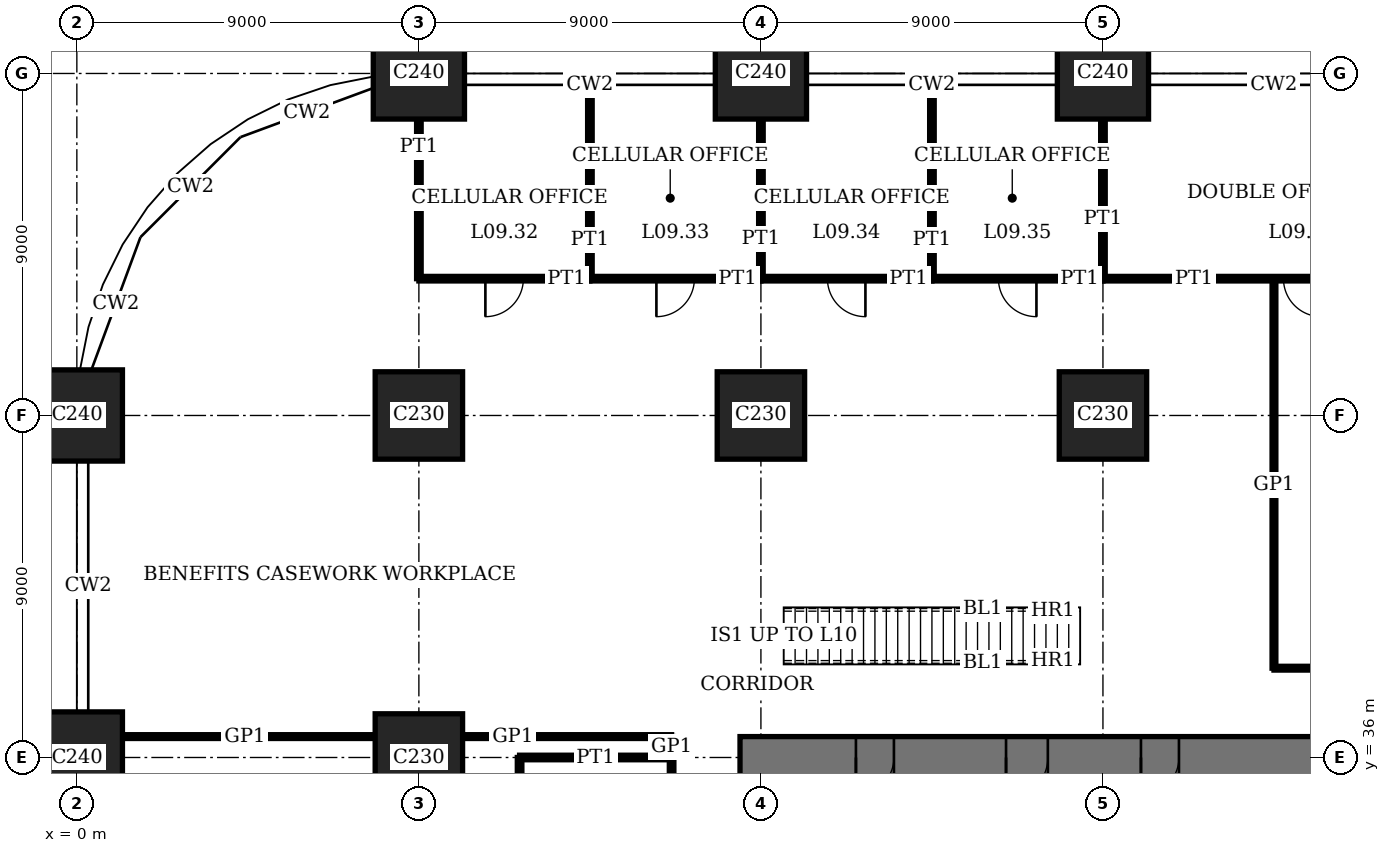
"""IFC4 building model, lengths in metres.
Left out: names, types, materials, properties, quantities, classifications, styles, units other than length and angle.
Written with IfcOpenShell. Run it as: python <this file> out.ifc"""

import sys

from ifc_helpers import new_model, si_unit, direction, frame, frame_2d, origin, origin_2d, place, context, subcontext, project, spatial, rectangle, extrude, element, fill, save


model = new_model("IFC4")
c1 = context("Model", 3, precision=1e-05, world=origin(), true_north=direction((0.0, 1.0)))
c2 = subcontext(c1, "Body", "Model", "MODEL_VIEW")
j1 = project(units=[si_unit("LENGTHUNIT", "METRE"), si_unit("PLANEANGLEUNIT", "RADIAN")], contexts=[c1])
p1 = place(None, origin())
s1 = spatial("IfcSite", under=j1, at=p1, CompositionType="ELEMENT")
p2 = place(p1, origin())
s2 = spatial("IfcBuilding", under=s1, at=p2, CompositionType="ELEMENT")
p3 = place(p2, frame((0.0, 0.0, 39.8)))
s3 = spatial("IfcBuildingStorey", under=s2, at=p3, CompositionType="ELEMENT", Elevation=39.8)
for number, where, z_axis, x_axis in (
    (1, (0.0, 36.0, 0.0), (0.0, 0.0, 1.0), (1.0, 0.0, 0.0)),
    (2, (0.0, 45.0, 0.0), (0.0, 0.0, 1.0), (1.0, 0.0, 0.0)),
):
    element("IfcColumn", number, at=place(p3, frame(where, z_axis=z_axis, x_axis=x_axis)), inside=s3, PredefinedType="COLUMN", context=c2, shape_type="SweptSolid", body=[
        extrude(rectangle(XDim=2.4, YDim=2.4, at=origin_2d()), origin(), (0.0, 0.0, 1.0), 4.0),
    ])
for number, where, z_axis, x_axis in (
    (3, (9.0, 36.0, 0.0), (0.0, 0.0, 1.0), (1.0, 0.0, 0.0)),
    (4, (9.0, 45.0, 0.0), (0.0, 0.0, 1.0), (1.0, 0.0, 0.0)),
):
    element("IfcColumn", number, at=place(p3, frame(where, z_axis=z_axis, x_axis=x_axis)), inside=s3, PredefinedType="COLUMN", context=c2, shape_type="SweptSolid", body=[
        extrude(rectangle(XDim=2.3, YDim=2.3, at=origin_2d()), origin(), (0.0, 0.0, 1.0), 4.0),
    ])
p4 = place(p3, frame((9.0, 54.0, 0.0), z_axis=(0.0, 0.0, 1.0), x_axis=(1.0, 0.0, 0.0)))
e5 = element("IfcColumn", 5, at=p4, inside=s3, PredefinedType="COLUMN", context=c2, shape_type="SweptSolid", body=[
    extrude(rectangle(XDim=2.4, YDim=2.4, at=origin_2d()), origin(), (0.0, 0.0, 1.0), 4.0),
])
p5 = place(p3, frame((18.0, 45.0, 0.0), z_axis=(0.0, 0.0, 1.0), x_axis=(1.0, 0.0, 0.0)))
e6 = element("IfcColumn", 6, at=p5, inside=s3, PredefinedType="COLUMN", context=c2, shape_type="SweptSolid", body=[
    extrude(rectangle(XDim=2.3, YDim=2.3, at=origin_2d()), origin(), (0.0, 0.0, 1.0), 4.0),
])
p6 = place(p3, frame((18.0, 54.0, 0.0), z_axis=(0.0, 0.0, 1.0), x_axis=(1.0, 0.0, 0.0)))
e7 = element("IfcColumn", 7, at=p6, inside=s3, PredefinedType="COLUMN", context=c2, shape_type="SweptSolid", body=[
    extrude(rectangle(XDim=2.4, YDim=2.4, at=origin_2d()), origin(), (0.0, 0.0, 1.0), 4.0),
])
p7 = place(p3, frame((27.0, 45.0, 0.0), z_axis=(0.0, 0.0, 1.0), x_axis=(1.0, 0.0, 0.0)))
e8 = element("IfcColumn", 8, at=p7, inside=s3, PredefinedType="COLUMN", context=c2, shape_type="SweptSolid", body=[
    extrude(rectangle(XDim=2.3, YDim=2.3, at=origin_2d()), origin(), (0.0, 0.0, 1.0), 4.0),
])
p8 = place(p3, frame((27.0, 54.0, 0.0), z_axis=(0.0, 0.0, 1.0), x_axis=(1.0, 0.0, 0.0)))
e9 = element("IfcColumn", 9, at=p8, inside=s3, PredefinedType="COLUMN", context=c2, shape_type="SweptSolid", body=[
    extrude(rectangle(XDim=2.4, YDim=2.4, at=origin_2d()), origin(), (0.0, 0.0, 1.0), 4.0),
])
p9 = place(p3, frame((45.55, 36.0, 0.0), z_axis=(0.0, 0.0, 1.0), x_axis=(-1.0, 0.0, 0.0)))
e10 = element("IfcWall", 10, at=p9, inside=s3, PredefinedType="SHEAR", context=c2, shape_type="SweptSolid", body=[
    extrude(rectangle(XDim=28.1, YDim=1.1, at=frame_2d((14.05, 0.0))), origin(), (0.0, 0.0, 1.0), 4.0),
])
p10 = place(p9, frame((11.55, 0.0, 0.0)))
e11 = element("IfcOpeningElement", 11, at=p10, cuts=e10, PredefinedType="OPENING", context=c2, shape_type="SweptSolid", body=[
    extrude(rectangle(XDim=1.0, YDim=2.4, at=frame_2d((0.5, 1.2))), frame((0.0, 0.56, 0.0), z_axis=(0.0, -1.0, 0.0), x_axis=(1.0, 0.0, 0.0)), (0.0, 0.0, 1.0), 1.12),
])
p11 = place(p9, frame((16.55, 0.0, 0.0)))
e12 = element("IfcOpeningElement", 12, at=p11, cuts=e10, PredefinedType="OPENING", context=c2, shape_type="SweptSolid", body=[
    extrude(rectangle(XDim=1.0, YDim=2.4, at=frame_2d((0.5, 1.2))), frame((0.0, 0.56, 0.0), z_axis=(0.0, -1.0, 0.0), x_axis=(1.0, 0.0, 0.0)), (0.0, 0.0, 1.0), 1.12),
])
p12 = place(p9, frame((20.0, 0.0, 0.0)))
e13 = element("IfcOpeningElement", 13, at=p12, cuts=e10, PredefinedType="OPENING", context=c2, shape_type="SweptSolid", body=[
    extrude(rectangle(XDim=1.1, YDim=2.4, at=frame_2d((0.55, 1.2))), frame((0.0, 0.56, 0.0), z_axis=(0.0, -1.0, 0.0), x_axis=(1.0, 0.0, 0.0)), (0.0, 0.0, 1.0), 1.12),
])
p13 = place(p9, frame((24.05, 0.0, 0.0)))
e14 = element("IfcOpeningElement", 14, at=p13, cuts=e10, PredefinedType="OPENING", context=c2, shape_type="SweptSolid", body=[
    extrude(rectangle(XDim=1.0, YDim=2.4, at=frame_2d((0.5, 1.2))), frame((0.0, 0.56, 0.0), z_axis=(0.0, -1.0, 0.0), x_axis=(1.0, 0.0, 0.0)), (0.0, 0.0, 1.0), 1.12),
])
p14 = place(p3, frame((11.65, 36.0, 0.0), z_axis=(0.0, 0.0, 1.0), x_axis=(1.0, 0.0, 0.0)))
e15 = element("IfcWall", 15, at=p14, inside=s3, PredefinedType="PARTITIONING", context=c2, shape_type="SweptSolid", body=[
    extrude(rectangle(XDim=4.0, YDim=0.12, at=frame_2d((2.0, 0.0))), origin(), (0.0, 0.0, 1.0), 3.05),
])
p15 = place(p3, frame((1.2, 36.55, 0.0), z_axis=(0.0, 0.0, 1.0), x_axis=(1.0, 0.0, 0.0)))
e16 = element("IfcWall", 16, at=p15, inside=s3, PredefinedType="PARTITIONING", context=c2, shape_type="SweptSolid", body=[
    extrude(rectangle(XDim=6.65, YDim=0.1, at=frame_2d((3.325, 0.0))), origin(), (0.0, 0.0, 1.0), 3.75),
])
p16 = place(p3, frame((10.15, 36.55, 0.0), z_axis=(0.0, 0.0, 1.0), x_axis=(1.0, 0.0, 0.0)))
e17 = element("IfcWall", 17, at=p16, inside=s3, PredefinedType="PARTITIONING", context=c2, shape_type="SweptSolid", body=[
    extrude(rectangle(XDim=5.5, YDim=0.1, at=frame_2d((2.75, 0.0))), origin(), (0.0, 0.0, 1.0), 3.75),
])
p17 = place(p3, frame((31.5, 38.35, 0.0), z_axis=(0.0, 0.0, 1.0), x_axis=(1.0, 0.0, 0.0)))
e18 = element("IfcWall", 18, at=p17, inside=s3, PredefinedType="PARTITIONING", context=c2, shape_type="SweptSolid", body=[
    extrude(rectangle(XDim=4.5, YDim=0.1, at=frame_2d((2.25, 0.0))), origin(), (0.0, 0.0, 1.0), 3.75),
])
p18 = place(p17, frame((1.75, 0.0, 0.0)))
e19 = element("IfcOpeningElement", 19, at=p18, cuts=e18, PredefinedType="OPENING", context=c2, shape_type="SweptSolid", body=[
    extrude(rectangle(XDim=1.0, YDim=2.4, at=frame_2d((0.5, 1.2))), frame((0.0, 0.06, 0.0), z_axis=(0.0, -1.0, 0.0), x_axis=(1.0, 0.0, 0.0)), (0.0, 0.0, 1.0), 0.12),
])
p19 = place(p3, frame((9.0, 48.6, 0.0), z_axis=(0.0, 0.0, 1.0), x_axis=(1.0, 0.0, 0.0)))
e20 = element("IfcWall", 20, at=p19, inside=s3, PredefinedType="PARTITIONING", context=c2, shape_type="SweptSolid", body=[
    extrude(rectangle(XDim=4.5, YDim=0.12, at=frame_2d((2.25, 0.0))), origin(), (0.0, 0.0, 1.0), 3.75),
])
p20 = place(p19, frame((1.75, 0.0, 0.0)))
e21 = element("IfcOpeningElement", 21, at=p20, cuts=e20, PredefinedType="OPENING", context=c2, shape_type="SweptSolid", body=[
    extrude(rectangle(XDim=1.0, YDim=2.4, at=frame_2d((0.5, 1.2))), frame((0.0, 0.07, 0.0), z_axis=(0.0, -1.0, 0.0), x_axis=(1.0, 0.0, 0.0)), (0.0, 0.0, 1.0), 0.14),
])
p21 = place(p3, frame((13.5, 48.6, 0.0), z_axis=(0.0, 0.0, 1.0), x_axis=(1.0, 0.0, 0.0)))
e22 = element("IfcWall", 22, at=p21, inside=s3, PredefinedType="PARTITIONING", context=c2, shape_type="SweptSolid", body=[
    extrude(rectangle(XDim=4.5, YDim=0.12, at=frame_2d((2.25, 0.0))), origin(), (0.0, 0.0, 1.0), 3.75),
])
p22 = place(p21, frame((1.75, 0.0, 0.0)))
e23 = element("IfcOpeningElement", 23, at=p22, cuts=e22, PredefinedType="OPENING", context=c2, shape_type="SweptSolid", body=[
    extrude(rectangle(XDim=1.0, YDim=2.4, at=frame_2d((0.5, 1.2))), frame((0.0, 0.07, 0.0), z_axis=(0.0, -1.0, 0.0), x_axis=(1.0, 0.0, 0.0)), (0.0, 0.0, 1.0), 0.14),
])
p23 = place(p3, frame((18.0, 48.6, 0.0), z_axis=(0.0, 0.0, 1.0), x_axis=(1.0, 0.0, 0.0)))
e24 = element("IfcWall", 24, at=p23, inside=s3, PredefinedType="PARTITIONING", context=c2, shape_type="SweptSolid", body=[
    extrude(rectangle(XDim=4.5, YDim=0.12, at=frame_2d((2.25, 0.0))), origin(), (0.0, 0.0, 1.0), 3.75),
])
p24 = place(p23, frame((1.75, 0.0, 0.0)))
e25 = element("IfcOpeningElement", 25, at=p24, cuts=e24, PredefinedType="OPENING", context=c2, shape_type="SweptSolid", body=[
    extrude(rectangle(XDim=1.0, YDim=2.4, at=frame_2d((0.5, 1.2))), frame((0.0, 0.07, 0.0), z_axis=(0.0, -1.0, 0.0), x_axis=(1.0, 0.0, 0.0)), (0.0, 0.0, 1.0), 0.14),
])
p25 = place(p3, frame((22.5, 48.6, 0.0), z_axis=(0.0, 0.0, 1.0), x_axis=(1.0, 0.0, 0.0)))
e26 = element("IfcWall", 26, at=p25, inside=s3, PredefinedType="PARTITIONING", context=c2, shape_type="SweptSolid", body=[
    extrude(rectangle(XDim=4.5, YDim=0.12, at=frame_2d((2.25, 0.0))), origin(), (0.0, 0.0, 1.0), 3.75),
])
p26 = place(p25, frame((1.75, 0.0, 0.0)))
e27 = element("IfcOpeningElement", 27, at=p26, cuts=e26, PredefinedType="OPENING", context=c2, shape_type="SweptSolid", body=[
    extrude(rectangle(XDim=1.0, YDim=2.4, at=frame_2d((0.5, 1.2))), frame((0.0, 0.07, 0.0), z_axis=(0.0, -1.0, 0.0), x_axis=(1.0, 0.0, 0.0)), (0.0, 0.0, 1.0), 0.14),
])
p27 = place(p3, frame((27.0, 48.6, 0.0), z_axis=(0.0, 0.0, 1.0), x_axis=(1.0, 0.0, 0.0)))
e28 = element("IfcWall", 28, at=p27, inside=s3, PredefinedType="PARTITIONING", context=c2, shape_type="SweptSolid", body=[
    extrude(rectangle(XDim=9.0, YDim=0.12, at=frame_2d((4.5, 0.0))), origin(), (0.0, 0.0, 1.0), 3.75),
])
p28 = place(p27, frame((4.75, 0.0, 0.0)))
e29 = element("IfcOpeningElement", 29, at=p28, cuts=e28, PredefinedType="OPENING", context=c2, shape_type="SweptSolid", body=[
    extrude(rectangle(XDim=1.0, YDim=2.4, at=frame_2d((0.5, 1.2))), frame((0.0, 0.07, 0.0), z_axis=(0.0, -1.0, 0.0), x_axis=(1.0, 0.0, 0.0)), (0.0, 0.0, 1.0), 0.14),
])
p29 = place(p3, frame((9.0, 48.6, 0.0), z_axis=(0.0, 0.0, 1.0), x_axis=(0.0, 1.0, 0.0)))
e30 = element("IfcWall", 30, at=p29, inside=s3, PredefinedType="PARTITIONING", context=c2, shape_type="SweptSolid", body=[
    extrude(rectangle(XDim=4.2, YDim=0.12, at=frame_2d((2.1, 0.0))), origin(), (0.0, 0.0, 1.0), 3.05),
])
p30 = place(p3, frame((11.65, 31.5, 0.0), z_axis=(0.0, 0.0, 1.0), x_axis=(0.0, 1.0, 0.0)))
e31 = element("IfcWall", 31, at=p30, inside=s3, PredefinedType="PARTITIONING", context=c2, shape_type="SweptSolid", body=[
    extrude(rectangle(XDim=4.5, YDim=0.12, at=frame_2d((2.25, 0.0))), origin(), (0.0, 0.0, 1.0), 3.75),
])
p31 = place(p30, frame((1.75, 0.0, 0.0)))
e32 = element("IfcOpeningElement", 32, at=p31, cuts=e31, PredefinedType="OPENING", context=c2, shape_type="SweptSolid", body=[
    extrude(rectangle(XDim=1.0, YDim=2.4, at=frame_2d((0.5, 1.2))), frame((0.0, 0.07, 0.0), z_axis=(0.0, -1.0, 0.0), x_axis=(1.0, 0.0, 0.0)), (0.0, 0.0, 1.0), 0.14),
])
p32 = place(p3, frame((13.5, 48.6, 0.0), z_axis=(0.0, 0.0, 1.0), x_axis=(0.0, 1.0, 0.0)))
e33 = element("IfcWall", 33, at=p32, inside=s3, PredefinedType="PARTITIONING", context=c2, shape_type="SweptSolid", body=[
    extrude(rectangle(XDim=5.09, YDim=0.12, at=frame_2d((2.545, 0.0))), origin(), (0.0, 0.0, 1.0), 3.75),
])
p33 = place(p3, frame((15.65, 31.5, 0.0), z_axis=(0.0, 0.0, 1.0), x_axis=(0.0, 1.0, 0.0)))
e34 = element("IfcWall", 34, at=p33, inside=s3, PredefinedType="PARTITIONING", context=c2, shape_type="SweptSolid", body=[
    extrude(rectangle(XDim=4.5, YDim=0.12, at=frame_2d((2.25, 0.0))), origin(), (0.0, 0.0, 1.0), 3.75),
])
p34 = place(p3, frame((15.65, 36.0, 0.0), z_axis=(0.0, 0.0, 1.0), x_axis=(0.0, 1.0, 0.0)))
e35 = element("IfcWall", 35, at=p34, inside=s3, PredefinedType="PARTITIONING", context=c2, shape_type="SweptSolid", body=[
    extrude(rectangle(XDim=0.55, YDim=0.1, at=frame_2d((0.275, 0.0))), origin(), (0.0, 0.0, 1.0), 3.75),
])
p35 = place(p3, frame((18.0, 48.6, 0.0), z_axis=(0.0, 0.0, 1.0), x_axis=(0.0, 1.0, 0.0)))
e36 = element("IfcWall", 36, at=p35, inside=s3, PredefinedType="PARTITIONING", context=c2, shape_type="SweptSolid", body=[
    extrude(rectangle(XDim=4.2, YDim=0.12, at=frame_2d((2.1, 0.0))), origin(), (0.0, 0.0, 1.0), 3.05),
])
p36 = place(p3, frame((22.5, 48.6, 0.0), z_axis=(0.0, 0.0, 1.0), x_axis=(0.0, 1.0, 0.0)))
e37 = element("IfcWall", 37, at=p36, inside=s3, PredefinedType="PARTITIONING", context=c2, shape_type="SweptSolid", body=[
    extrude(rectangle(XDim=5.09, YDim=0.12, at=frame_2d((2.545, 0.0))), origin(), (0.0, 0.0, 1.0), 3.75),
])
p37 = place(p3, frame((27.0, 48.6, 0.0), z_axis=(0.0, 0.0, 1.0), x_axis=(0.0, 1.0, 0.0)))
e38 = element("IfcWall", 38, at=p37, inside=s3, PredefinedType="PARTITIONING", context=c2, shape_type="SweptSolid", body=[
    extrude(rectangle(XDim=4.2, YDim=0.12, at=frame_2d((2.1, 0.0))), origin(), (0.0, 0.0, 1.0), 3.05),
])
p38 = place(p3, frame((31.5, 38.35, 0.0), z_axis=(0.0, 0.0, 1.0), x_axis=(0.0, 1.0, 0.0)))
e39 = element("IfcWall", 39, at=p38, inside=s3, PredefinedType="PARTITIONING", context=c2, shape_type="SweptSolid", body=[
    extrude(rectangle(XDim=10.26, YDim=0.1, at=frame_2d((5.13, 0.0))), origin(), (0.0, 0.0, 1.0), 3.75),
])
p39 = place(p11, origin())
e40 = element("IfcDoor", 40, at=p39, inside=s3, OperationType="SINGLE_SWING_LEFT", PredefinedType="DOOR", context=c2, shape_type="SweptSolid", body=[
    extrude(rectangle(XDim=1.0, YDim=2.4, at=frame_2d((0.5, 1.2))), frame((0.0, 0.025, 0.0), z_axis=(0.0, -1.0, 0.0), x_axis=(1.0, 0.0, 0.0)), (0.0, 0.0, 1.0), 0.05),
    extrude(rectangle(XDim=0.04, YDim=2.4, at=frame_2d((0.02, 1.2))), frame((0.0, 0.4, 0.0), z_axis=(0.0, -1.0, 0.0), x_axis=(1.0, 0.0, 0.0)), (0.0, 0.0, 1.0), 0.8),
    extrude(rectangle(XDim=0.04, YDim=2.4, at=frame_2d((0.98, 1.2))), frame((0.0, 0.4, 0.0), z_axis=(0.0, -1.0, 0.0), x_axis=(1.0, 0.0, 0.0)), (0.0, 0.0, 1.0), 0.8),
    extrude(rectangle(XDim=1.0, YDim=0.04, at=frame_2d((0.5, 2.38))), frame((0.0, 0.4, 0.0), z_axis=(0.0, -1.0, 0.0), x_axis=(1.0, 0.0, 0.0)), (0.0, 0.0, 1.0), 0.8),
])
fill(e12, e40)
p40 = place(p12, origin())
e41 = element("IfcDoor", 41, at=p40, inside=s3, OperationType="SINGLE_SWING_LEFT", PredefinedType="DOOR", context=c2, shape_type="SweptSolid", body=[
    extrude(rectangle(XDim=1.1, YDim=2.4, at=frame_2d((0.55, 1.2))), frame((0.0, 0.025, 0.0), z_axis=(0.0, -1.0, 0.0), x_axis=(1.0, 0.0, 0.0)), (0.0, 0.0, 1.0), 0.05),
    extrude(rectangle(XDim=0.04, YDim=2.4, at=frame_2d((0.02, 1.2))), frame((0.0, 0.44, 0.0), z_axis=(0.0, -1.0, 0.0), x_axis=(1.0, 0.0, 0.0)), (0.0, 0.0, 1.0), 0.88),
    extrude(rectangle(XDim=0.04, YDim=2.4, at=frame_2d((1.08, 1.2))), frame((0.0, 0.44, 0.0), z_axis=(0.0, -1.0, 0.0), x_axis=(1.0, 0.0, 0.0)), (0.0, 0.0, 1.0), 0.88),
    extrude(rectangle(XDim=1.1, YDim=0.04, at=frame_2d((0.55, 2.38))), frame((0.0, 0.44, 0.0), z_axis=(0.0, -1.0, 0.0), x_axis=(1.0, 0.0, 0.0)), (0.0, 0.0, 1.0), 0.88),
])
fill(e13, e41)
p41 = place(p13, origin())
e42 = element("IfcDoor", 42, at=p41, inside=s3, OperationType="SINGLE_SWING_LEFT", PredefinedType="DOOR", context=c2, shape_type="SweptSolid", body=[
    extrude(rectangle(XDim=1.0, YDim=2.4, at=frame_2d((0.5, 1.2))), frame((0.0, 0.025, 0.0), z_axis=(0.0, -1.0, 0.0), x_axis=(1.0, 0.0, 0.0)), (0.0, 0.0, 1.0), 0.05),
    extrude(rectangle(XDim=0.04, YDim=2.4, at=frame_2d((0.02, 1.2))), frame((0.0, 0.4, 0.0), z_axis=(0.0, -1.0, 0.0), x_axis=(1.0, 0.0, 0.0)), (0.0, 0.0, 1.0), 0.8),
    extrude(rectangle(XDim=0.04, YDim=2.4, at=frame_2d((0.98, 1.2))), frame((0.0, 0.4, 0.0), z_axis=(0.0, -1.0, 0.0), x_axis=(1.0, 0.0, 0.0)), (0.0, 0.0, 1.0), 0.8),
    extrude(rectangle(XDim=1.0, YDim=0.04, at=frame_2d((0.5, 2.38))), frame((0.0, 0.4, 0.0), z_axis=(0.0, -1.0, 0.0), x_axis=(1.0, 0.0, 0.0)), (0.0, 0.0, 1.0), 0.8),
])
fill(e14, e42)
p42 = place(p20, origin())
e43 = element("IfcDoor", 43, at=p42, inside=s3, OperationType="SINGLE_SWING_LEFT", PredefinedType="DOOR", context=c2, shape_type="SweptSolid", body=[
    extrude(rectangle(XDim=1.0, YDim=2.4, at=frame_2d((0.5, 1.2))), frame((0.0, 0.025, 0.0), z_axis=(0.0, -1.0, 0.0), x_axis=(1.0, 0.0, 0.0)), (0.0, 0.0, 1.0), 0.05),
])
fill(e21, e43)
p43 = place(p22, origin())
e44 = element("IfcDoor", 44, at=p43, inside=s3, OperationType="SINGLE_SWING_LEFT", PredefinedType="DOOR", context=c2, shape_type="SweptSolid", body=[
    extrude(rectangle(XDim=1.0, YDim=2.4, at=frame_2d((0.5, 1.2))), frame((0.0, 0.025, 0.0), z_axis=(0.0, -1.0, 0.0), x_axis=(1.0, 0.0, 0.0)), (0.0, 0.0, 1.0), 0.05),
])
fill(e23, e44)
p44 = place(p24, origin())
e45 = element("IfcDoor", 45, at=p44, inside=s3, OperationType="SINGLE_SWING_RIGHT", PredefinedType="DOOR", context=c2, shape_type="SweptSolid", body=[
    extrude(rectangle(XDim=1.0, YDim=2.4, at=frame_2d((0.5, 1.2))), frame((0.0, 0.025, 0.0), z_axis=(0.0, -1.0, 0.0), x_axis=(1.0, 0.0, 0.0)), (0.0, 0.0, 1.0), 0.05),
])
fill(e25, e45)
p45 = place(p26, origin())
e46 = element("IfcDoor", 46, at=p45, inside=s3, OperationType="SINGLE_SWING_RIGHT", PredefinedType="DOOR", context=c2, shape_type="SweptSolid", body=[
    extrude(rectangle(XDim=1.0, YDim=2.4, at=frame_2d((0.5, 1.2))), frame((0.0, 0.025, 0.0), z_axis=(0.0, -1.0, 0.0), x_axis=(1.0, 0.0, 0.0)), (0.0, 0.0, 1.0), 0.05),
])
fill(e27, e46)
p46 = place(p28, origin())
e47 = element("IfcDoor", 47, at=p46, inside=s3, OperationType="SINGLE_SWING_RIGHT", PredefinedType="DOOR", context=c2, shape_type="SweptSolid", body=[
    extrude(rectangle(XDim=1.0, YDim=2.4, at=frame_2d((0.5, 1.2))), frame((0.0, 0.025, 0.0), z_axis=(0.0, -1.0, 0.0), x_axis=(1.0, 0.0, 0.0)), (0.0, 0.0, 1.0), 0.05),
])
fill(e29, e47)
save(model, sys.argv[1])
